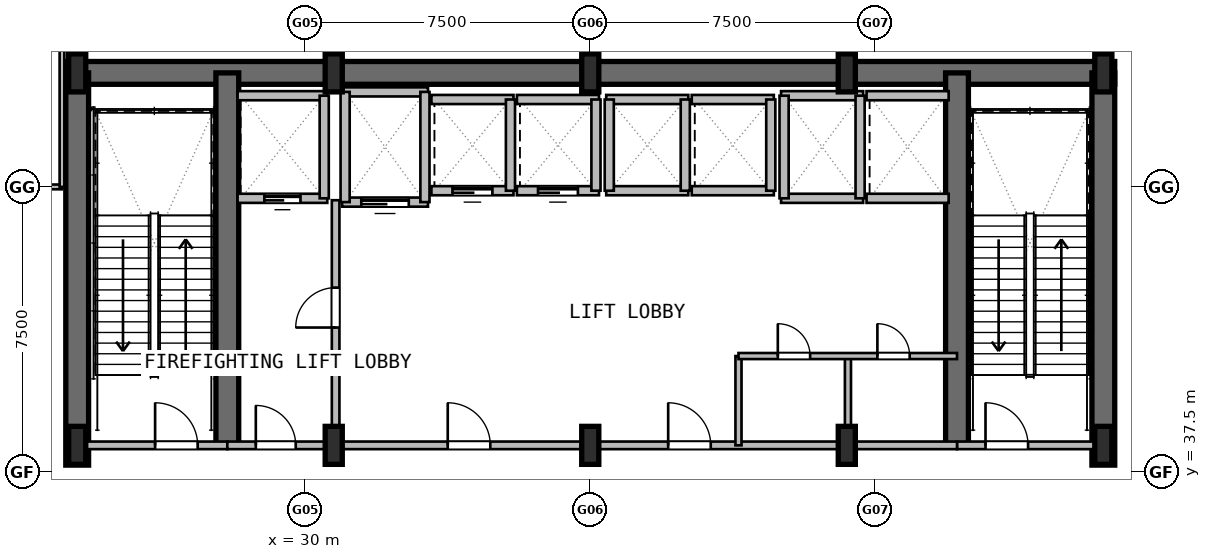
"""IFC4 building model, lengths in metres.
Left out: names, types, materials, properties, quantities, classifications, styles, units other than length and angle.
Written with IfcOpenShell. Run it as: python <this file> out.ifc"""

import sys

from ifc_helpers import new_model, si_unit, direction, frame, frame_2d, origin, origin_2d, place, context, subcontext, project, spatial, rectangle, i_section, extrude, element, fill, save


model = new_model("IFC4")
c1 = context("Model", 3, precision=1e-05, world=origin(), true_north=direction((0.0, 1.0)))
c2 = subcontext(c1, "Body", "Model", "MODEL_VIEW")
j1 = project(units=[si_unit("LENGTHUNIT", "METRE"), si_unit("PLANEANGLEUNIT", "RADIAN")], contexts=[c1])
p1 = place(None, origin())
s1 = spatial("IfcSite", under=j1, at=p1, CompositionType="ELEMENT")
p2 = place(p1, origin())
s2 = spatial("IfcBuilding", under=s1, at=p2, CompositionType="ELEMENT")
p3 = place(p2, frame((0.0, 0.0, 25.2)))
s3 = spatial("IfcBuildingStorey", under=s2, at=p3, CompositionType="ELEMENT", Elevation=25.2)
p4 = place(p3, frame((23.7, 48.0, 0.0), z_axis=(0.0, 0.0, 1.0), x_axis=(1.0, 0.0, 0.0)))
e1 = element("IfcWall", 1, at=p4, inside=s3, PredefinedType="SHEAR", context=c2, shape_type="SweptSolid", body=[
    extrude(rectangle(XDim=27.6, YDim=0.6, at=frame_2d((13.8, 0.0))), origin(), (0.0, 0.0, 1.0), 5.4),
])
for number, where, z_axis, x_axis in (
    (2, (24.0, 37.68, 0.0), (0.0, 0.0, 1.0), (0.0, 1.0, 0.0)),
    (3, (51.0, 37.68, 0.0), (0.0, 0.0, 1.0), (0.0, 1.0, 0.0)),
):
    element("IfcWall", number, at=place(p3, frame(where, z_axis=z_axis, x_axis=x_axis)), inside=s3, PredefinedType="SHEAR", context=c2, shape_type="SweptSolid", body=[
        extrude(rectangle(XDim=10.32, YDim=0.6, at=frame_2d((5.16, 0.0))), origin(), (0.0, 0.0, 1.0), 5.4),
    ])
for number, where, z_axis, x_axis in (
    (4, (27.95, 38.2, 0.0), (0.0, 0.0, 1.0), (0.0, 1.0, 0.0)),
    (5, (47.15, 38.2, 0.0), (0.0, 0.0, 1.0), (0.0, 1.0, 0.0)),
):
    element("IfcWall", number, at=place(p3, frame(where, z_axis=z_axis, x_axis=x_axis)), inside=s3, PredefinedType="SHEAR", context=c2, shape_type="SweptSolid", body=[
        extrude(rectangle(XDim=9.8, YDim=0.6, at=frame_2d((4.9, 0.0))), origin(), (0.0, 0.0, 1.0), 5.4),
    ])
for number, where, z_axis, x_axis in (
    (6, (24.0, 38.2, 0.0), (0.0, 0.0, 1.0), (1.0, 0.0, 0.0)),
    (7, (24.0, 48.0, 0.0), (0.0, 0.0, 1.0), (1.0, 0.0, 0.0)),
    (8, (30.75, 38.2, 0.0), (0.0, 0.0, 1.0), (1.0, 0.0, 0.0)),
    (9, (30.75, 48.0, 0.0), (0.0, 0.0, 1.0), (1.0, 0.0, 0.0)),
    (10, (37.5, 38.2, 0.0), (0.0, 0.0, 1.0), (1.0, 0.0, 0.0)),
    (11, (37.5, 48.0, 0.0), (0.0, 0.0, 1.0), (1.0, 0.0, 0.0)),
    (12, (44.25, 38.2, 0.0), (0.0, 0.0, 1.0), (1.0, 0.0, 0.0)),
    (13, (44.25, 48.0, 0.0), (0.0, 0.0, 1.0), (1.0, 0.0, 0.0)),
    (14, (51.0, 38.2, 0.0), (0.0, 0.0, 1.0), (1.0, 0.0, 0.0)),
    (15, (51.0, 48.0, 0.0), (0.0, 0.0, 1.0), (1.0, 0.0, 0.0)),
):
    element("IfcColumn", number, at=place(p3, frame(where, z_axis=z_axis, x_axis=x_axis)), inside=s3, PredefinedType="COLUMN", context=c2, shape_type="SweptSolid", body=[
        extrude(i_section(OverallWidth=0.45, OverallDepth=1.0, WebThickness=0.022, FlangeThickness=0.04, at=origin_2d()), origin(), (0.0, 0.0, 1.0), 5.4),
    ])
p5 = place(p3, frame((24.0, 38.2, 0.0), z_axis=(0.0, 0.0, 1.0), x_axis=(1.0, 0.0, 0.0)))
e16 = element("IfcWall", 16, at=p5, inside=s3, PredefinedType="PARTITIONING", context=c2, shape_type="SweptSolid", body=[
    extrude(rectangle(XDim=3.95, YDim=0.2, at=frame_2d((1.975, 0.0))), origin(), (0.0, 0.0, 1.0), 4.33),
])
p6 = place(p5, frame((2.05, 0.0, 0.0)))
e17 = element("IfcOpeningElement", 17, at=p6, cuts=e16, PredefinedType="OPENING", context=c2, shape_type="SweptSolid", body=[
    extrude(rectangle(XDim=1.12, YDim=2.1, at=frame_2d((0.56, 1.05))), frame((0.0, 0.11, 0.0), z_axis=(0.0, -1.0, 0.0), x_axis=(1.0, 0.0, 0.0)), (0.0, 0.0, 1.0), 0.22),
])
p7 = place(p3, frame((47.15, 38.2, 0.0), z_axis=(0.0, 0.0, 1.0), x_axis=(1.0, 0.0, 0.0)))
e18 = element("IfcWall", 18, at=p7, inside=s3, PredefinedType="PARTITIONING", context=c2, shape_type="SweptSolid", body=[
    extrude(rectangle(XDim=3.85, YDim=0.2, at=frame_2d((1.925, 0.0))), origin(), (0.0, 0.0, 1.0), 4.33),
])
p8 = place(p7, frame((0.75, 0.0, 0.0)))
e19 = element("IfcOpeningElement", 19, at=p8, cuts=e18, PredefinedType="OPENING", context=c2, shape_type="SweptSolid", body=[
    extrude(rectangle(XDim=1.12, YDim=2.1, at=frame_2d((0.56, 1.05))), frame((0.0, 0.11, 0.0), z_axis=(0.0, -1.0, 0.0), x_axis=(1.0, 0.0, 0.0)), (0.0, 0.0, 1.0), 0.22),
])
p9 = place(p3, frame((30.8, 38.2, 0.0), z_axis=(0.0, 0.0, 1.0), x_axis=(0.0, 1.0, 0.0)))
e20 = element("IfcWall", 20, at=p9, inside=s3, PredefinedType="PARTITIONING", context=c2, shape_type="SweptSolid", body=[
    extrude(rectangle(XDim=6.45, YDim=0.2, at=frame_2d((3.225, 0.0))), origin(), (0.0, 0.0, 1.0), 4.33),
])
p10 = place(p9, frame((3.1, 0.0, 0.0)))
e21 = element("IfcOpeningElement", 21, at=p10, cuts=e20, PredefinedType="OPENING", context=c2, shape_type="SweptSolid", body=[
    extrude(rectangle(XDim=1.05, YDim=2.1, at=frame_2d((0.525, 1.05))), frame((0.0, 0.11, 0.0), z_axis=(0.0, -1.0, 0.0), x_axis=(1.0, 0.0, 0.0)), (0.0, 0.0, 1.0), 0.22),
])
p11 = place(p3, frame((27.95, 38.2, 0.0), z_axis=(0.0, 0.0, 1.0), x_axis=(1.0, 0.0, 0.0)))
e22 = element("IfcWall", 22, at=p11, inside=s3, PredefinedType="PARTITIONING", context=c2, shape_type="SweptSolid", body=[
    extrude(rectangle(XDim=2.85, YDim=0.2, at=frame_2d((1.425, 0.0))), origin(), (0.0, 0.0, 1.0), 4.33),
])
p12 = place(p11, frame((0.75, 0.0, 0.0)))
e23 = element("IfcOpeningElement", 23, at=p12, cuts=e22, PredefinedType="OPENING", context=c2, shape_type="SweptSolid", body=[
    extrude(rectangle(XDim=1.05, YDim=2.1, at=frame_2d((0.525, 1.05))), frame((0.0, 0.11, 0.0), z_axis=(0.0, -1.0, 0.0), x_axis=(1.0, 0.0, 0.0)), (0.0, 0.0, 1.0), 0.22),
])
p13 = place(p3, frame((30.8, 38.2, 0.0), z_axis=(0.0, 0.0, 1.0), x_axis=(1.0, 0.0, 0.0)))
e24 = element("IfcWall", 24, at=p13, inside=s3, PredefinedType="PARTITIONING", context=c2, shape_type="SweptSolid", body=[
    extrude(rectangle(XDim=16.35, YDim=0.2, at=frame_2d((8.175, 0.0))), origin(), (0.0, 0.0, 1.0), 4.33),
])
p14 = place(p13, frame((2.95, 0.0, 0.0)))
e25 = element("IfcOpeningElement", 25, at=p14, cuts=e24, PredefinedType="OPENING", context=c2, shape_type="SweptSolid", body=[
    extrude(rectangle(XDim=1.12, YDim=2.1, at=frame_2d((0.56, 1.05))), frame((0.0, 0.11, 0.0), z_axis=(0.0, -1.0, 0.0), x_axis=(1.0, 0.0, 0.0)), (0.0, 0.0, 1.0), 0.22),
])
p15 = place(p13, frame((8.75, 0.0, 0.0)))
e26 = element("IfcOpeningElement", 26, at=p15, cuts=e24, PredefinedType="OPENING", context=c2, shape_type="SweptSolid", body=[
    extrude(rectangle(XDim=1.12, YDim=2.1, at=frame_2d((0.56, 1.05))), frame((0.0, 0.11, 0.0), z_axis=(0.0, -1.0, 0.0), x_axis=(1.0, 0.0, 0.0)), (0.0, 0.0, 1.0), 0.22),
])
p16 = place(p3, frame((28.22, 44.7, 0.0), z_axis=(0.0, 0.0, 1.0), x_axis=(1.0, 0.0, 0.0)))
e27 = element("IfcWall", 27, at=p16, inside=s3, PredefinedType="PARTITIONING", context=c2, shape_type="SweptSolid", body=[
    extrude(rectangle(XDim=2.36, YDim=0.24, at=frame_2d((1.18, 0.0))), origin(), (0.0, 0.0, 1.0), 5.13),
])
p17 = place(p16, frame((0.705, 0.0, 0.0)))
e28 = element("IfcOpeningElement", 28, at=p17, cuts=e27, PredefinedType="OPENING", context=c2, shape_type="SweptSolid", body=[
    extrude(rectangle(XDim=0.95, YDim=2.15, at=frame_2d((0.475, 1.075))), frame((0.0, 0.13, 0.0), z_axis=(0.0, -1.0, 0.0), x_axis=(1.0, 0.0, 0.0)), (0.0, 0.0, 1.0), 0.26),
])
p18 = place(p3, frame((28.22, 47.4, 0.0), z_axis=(0.0, 0.0, 1.0), x_axis=(1.0, 0.0, 0.0)))
e29 = element("IfcWall", 29, at=p18, inside=s3, PredefinedType="PARTITIONING", context=c2, shape_type="SweptSolid", body=[
    extrude(rectangle(XDim=2.36, YDim=0.24, at=frame_2d((1.18, 0.0))), origin(), (0.0, 0.0, 1.0), 5.13),
])
p19 = place(p3, frame((30.5, 44.7, 0.0), z_axis=(0.0, 0.0, 1.0), x_axis=(0.0, 1.0, 0.0)))
e30 = element("IfcWall", 30, at=p19, inside=s3, PredefinedType="PARTITIONING", context=c2, shape_type="SweptSolid", body=[
    extrude(rectangle(XDim=2.7, YDim=0.24, at=frame_2d((1.35, 0.0))), origin(), (0.0, 0.0, 1.0), 4.33),
])
p20 = place(p3, frame((30.97, 44.6, 0.0), z_axis=(0.0, 0.0, 1.0), x_axis=(1.0, 0.0, 0.0)))
e31 = element("IfcWall", 31, at=p20, inside=s3, PredefinedType="PARTITIONING", context=c2, shape_type="SweptSolid", body=[
    extrude(rectangle(XDim=2.26, YDim=0.24, at=frame_2d((1.13, 0.0))), origin(), (0.0, 0.0, 1.0), 5.13),
])
p21 = place(p20, frame((0.505, 0.0, 0.0)))
e32 = element("IfcOpeningElement", 32, at=p21, cuts=e31, PredefinedType="OPENING", context=c2, shape_type="SweptSolid", body=[
    extrude(rectangle(XDim=1.25, YDim=2.2, at=frame_2d((0.625, 1.1))), frame((0.0, 0.13, 0.0), z_axis=(0.0, -1.0, 0.0), x_axis=(1.0, 0.0, 0.0)), (0.0, 0.0, 1.0), 0.26),
])
p22 = place(p3, frame((30.97, 47.5, 0.0), z_axis=(0.0, 0.0, 1.0), x_axis=(1.0, 0.0, 0.0)))
e33 = element("IfcWall", 33, at=p22, inside=s3, PredefinedType="PARTITIONING", context=c2, shape_type="SweptSolid", body=[
    extrude(rectangle(XDim=2.26, YDim=0.24, at=frame_2d((1.13, 0.0))), origin(), (0.0, 0.0, 1.0), 5.13),
])
p23 = place(p3, frame((31.05, 44.6, 0.0), z_axis=(0.0, 0.0, 1.0), x_axis=(0.0, 1.0, 0.0)))
e34 = element("IfcWall", 34, at=p23, inside=s3, PredefinedType="PARTITIONING", context=c2, shape_type="SweptSolid", body=[
    extrude(rectangle(XDim=2.9, YDim=0.24, at=frame_2d((1.45, 0.0))), origin(), (0.0, 0.0, 1.0), 4.33),
])
p24 = place(p3, frame((33.15, 44.6, 0.0), z_axis=(0.0, 0.0, 1.0), x_axis=(0.0, 1.0, 0.0)))
e35 = element("IfcWall", 35, at=p24, inside=s3, PredefinedType="PARTITIONING", context=c2, shape_type="SweptSolid", body=[
    extrude(rectangle(XDim=2.9, YDim=0.24, at=frame_2d((1.45, 0.0))), origin(), (0.0, 0.0, 1.0), 5.13),
])
p25 = place(p3, frame((33.32, 44.9, 0.0), z_axis=(0.0, 0.0, 1.0), x_axis=(1.0, 0.0, 0.0)))
e36 = element("IfcWall", 36, at=p25, inside=s3, PredefinedType="PARTITIONING", context=c2, shape_type="SweptSolid", body=[
    extrude(rectangle(XDim=2.16, YDim=0.24, at=frame_2d((1.08, 0.0))), origin(), (0.0, 0.0, 1.0), 5.13),
])
p26 = place(p25, frame((0.555, 0.0, 0.0)))
e37 = element("IfcOpeningElement", 37, at=p26, cuts=e36, PredefinedType="OPENING", context=c2, shape_type="SweptSolid", body=[
    extrude(rectangle(XDim=1.05, YDim=2.15, at=frame_2d((0.525, 1.075))), frame((0.0, 0.13, 0.0), z_axis=(0.0, -1.0, 0.0), x_axis=(1.0, 0.0, 0.0)), (0.0, 0.0, 1.0), 0.26),
])
p27 = place(p3, frame((33.32, 47.3, 0.0), z_axis=(0.0, 0.0, 1.0), x_axis=(1.0, 0.0, 0.0)))
e38 = element("IfcWall", 38, at=p27, inside=s3, PredefinedType="PARTITIONING", context=c2, shape_type="SweptSolid", body=[
    extrude(rectangle(XDim=2.16, YDim=0.24, at=frame_2d((1.08, 0.0))), origin(), (0.0, 0.0, 1.0), 5.13),
])
p28 = place(p3, frame((35.4, 44.9, 0.0), z_axis=(0.0, 0.0, 1.0), x_axis=(0.0, 1.0, 0.0)))
e39 = element("IfcWall", 39, at=p28, inside=s3, PredefinedType="PARTITIONING", context=c2, shape_type="SweptSolid", body=[
    extrude(rectangle(XDim=2.4, YDim=0.24, at=frame_2d((1.2, 0.0))), origin(), (0.0, 0.0, 1.0), 5.13),
])
p29 = place(p3, frame((35.57, 44.9, 0.0), z_axis=(0.0, 0.0, 1.0), x_axis=(1.0, 0.0, 0.0)))
e40 = element("IfcWall", 40, at=p29, inside=s3, PredefinedType="PARTITIONING", context=c2, shape_type="SweptSolid", body=[
    extrude(rectangle(XDim=2.16, YDim=0.24, at=frame_2d((1.08, 0.0))), origin(), (0.0, 0.0, 1.0), 5.13),
])
p30 = place(p29, frame((0.555, 0.0, 0.0)))
e41 = element("IfcOpeningElement", 41, at=p30, cuts=e40, PredefinedType="OPENING", context=c2, shape_type="SweptSolid", body=[
    extrude(rectangle(XDim=1.05, YDim=2.15, at=frame_2d((0.525, 1.075))), frame((0.0, 0.13, 0.0), z_axis=(0.0, -1.0, 0.0), x_axis=(1.0, 0.0, 0.0)), (0.0, 0.0, 1.0), 0.26),
])
p31 = place(p3, frame((35.57, 47.3, 0.0), z_axis=(0.0, 0.0, 1.0), x_axis=(1.0, 0.0, 0.0)))
e42 = element("IfcWall", 42, at=p31, inside=s3, PredefinedType="PARTITIONING", context=c2, shape_type="SweptSolid", body=[
    extrude(rectangle(XDim=2.16, YDim=0.24, at=frame_2d((1.08, 0.0))), origin(), (0.0, 0.0, 1.0), 5.13),
])
p32 = place(p3, frame((37.65, 44.9, 0.0), z_axis=(0.0, 0.0, 1.0), x_axis=(0.0, 1.0, 0.0)))
e43 = element("IfcWall", 43, at=p32, inside=s3, PredefinedType="PARTITIONING", context=c2, shape_type="SweptSolid", body=[
    extrude(rectangle(XDim=2.4, YDim=0.24, at=frame_2d((1.2, 0.0))), origin(), (0.0, 0.0, 1.0), 5.13),
])
for number, where, z_axis, x_axis in (
    (44, (37.92, 44.9, 0.0), (0.0, 0.0, 1.0), (1.0, 0.0, 0.0)),
    (45, (37.92, 47.3, 0.0), (0.0, 0.0, 1.0), (1.0, 0.0, 0.0)),
):
    element("IfcWall", number, at=place(p3, frame(where, z_axis=z_axis, x_axis=x_axis)), inside=s3, PredefinedType="PARTITIONING", context=c2, shape_type="SweptSolid", body=[
        extrude(rectangle(XDim=2.16, YDim=0.24, at=frame_2d((1.08, 0.0))), origin(), (0.0, 0.0, 1.0), 5.13),
    ])
for number, where, z_axis, x_axis in (
    (46, (38.0, 44.9, 0.0), (0.0, 0.0, 1.0), (0.0, 1.0, 0.0)),
    (47, (40.0, 44.9, 0.0), (0.0, 0.0, 1.0), (0.0, 1.0, 0.0)),
):
    element("IfcWall", number, at=place(p3, frame(where, z_axis=z_axis, x_axis=x_axis)), inside=s3, PredefinedType="PARTITIONING", context=c2, shape_type="SweptSolid", body=[
        extrude(rectangle(XDim=2.4, YDim=0.24, at=frame_2d((1.2, 0.0))), origin(), (0.0, 0.0, 1.0), 5.13),
    ])
for number, where, z_axis, x_axis in (
    (48, (40.17, 44.9, 0.0), (0.0, 0.0, 1.0), (1.0, 0.0, 0.0)),
    (49, (40.17, 47.3, 0.0), (0.0, 0.0, 1.0), (1.0, 0.0, 0.0)),
):
    element("IfcWall", number, at=place(p3, frame(where, z_axis=z_axis, x_axis=x_axis)), inside=s3, PredefinedType="PARTITIONING", context=c2, shape_type="SweptSolid", body=[
        extrude(rectangle(XDim=2.16, YDim=0.24, at=frame_2d((1.08, 0.0))), origin(), (0.0, 0.0, 1.0), 5.13),
    ])
p33 = place(p3, frame((42.25, 44.9, 0.0), z_axis=(0.0, 0.0, 1.0), x_axis=(0.0, 1.0, 0.0)))
e50 = element("IfcWall", 50, at=p33, inside=s3, PredefinedType="PARTITIONING", context=c2, shape_type="SweptSolid", body=[
    extrude(rectangle(XDim=2.4, YDim=0.24, at=frame_2d((1.2, 0.0))), origin(), (0.0, 0.0, 1.0), 5.13),
])
for number, where, z_axis, x_axis in (
    (51, (42.52, 44.7, 0.0), (0.0, 0.0, 1.0), (1.0, 0.0, 0.0)),
    (52, (42.52, 47.4, 0.0), (0.0, 0.0, 1.0), (1.0, 0.0, 0.0)),
):
    element("IfcWall", number, at=place(p3, frame(where, z_axis=z_axis, x_axis=x_axis)), inside=s3, PredefinedType="PARTITIONING", context=c2, shape_type="SweptSolid", body=[
        extrude(rectangle(XDim=2.16, YDim=0.24, at=frame_2d((1.08, 0.0))), origin(), (0.0, 0.0, 1.0), 5.13),
    ])
for number, where, z_axis, x_axis in (
    (53, (42.6, 44.7, 0.0), (0.0, 0.0, 1.0), (0.0, 1.0, 0.0)),
    (54, (44.6, 44.7, 0.0), (0.0, 0.0, 1.0), (0.0, 1.0, 0.0)),
):
    element("IfcWall", number, at=place(p3, frame(where, z_axis=z_axis, x_axis=x_axis)), inside=s3, PredefinedType="PARTITIONING", context=c2, shape_type="SweptSolid", body=[
        extrude(rectangle(XDim=2.7, YDim=0.24, at=frame_2d((1.35, 0.0))), origin(), (0.0, 0.0, 1.0), 5.13),
    ])
for number, where, z_axis, x_axis in (
    (55, (44.77, 44.7, 0.0), (0.0, 0.0, 1.0), (1.0, 0.0, 0.0)),
    (56, (44.77, 47.4, 0.0), (0.0, 0.0, 1.0), (1.0, 0.0, 0.0)),
):
    element("IfcWall", number, at=place(p3, frame(where, z_axis=z_axis, x_axis=x_axis)), inside=s3, PredefinedType="PARTITIONING", context=c2, shape_type="SweptSolid", body=[
        extrude(rectangle(XDim=2.16, YDim=0.24, at=frame_2d((1.08, 0.0))), origin(), (0.0, 0.0, 1.0), 5.13),
    ])
p34 = place(p3, frame((19.0, 45.0, 0.0), z_axis=(0.0, 0.0, 1.0), x_axis=(1.0, 0.0, 0.0)))
e57 = element("IfcWall", 57, at=p34, inside=s3, PredefinedType="PARTITIONING", context=c2, shape_type="SweptSolid", body=[
    extrude(rectangle(XDim=4.6, YDim=0.125, at=frame_2d((2.3, 0.0))), origin(), (0.0, 0.0, 1.0), 5.13),
])
p35 = place(p34, frame((1.5, 0.0, 0.0)))
e58 = element("IfcOpeningElement", 58, at=p35, cuts=e57, PredefinedType="OPENING", context=c2, shape_type="SweptSolid", body=[
    extrude(rectangle(XDim=0.9, YDim=2.05, at=frame_2d((0.45, 1.025))), frame((0.0, 0.073, 0.0), z_axis=(0.0, -1.0, 0.0), x_axis=(1.0, 0.0, 0.0)), (0.0, 0.0, 1.0), 0.145),
])
p36 = place(p3, frame((23.6, 45.0, 0.0), z_axis=(0.0, 0.0, 1.0), x_axis=(0.0, 1.0, 0.0)))
e59 = element("IfcWall", 59, at=p36, inside=s3, PredefinedType="PARTITIONING", context=c2, shape_type="SweptSolid", body=[
    extrude(rectangle(XDim=4.6, YDim=0.125, at=frame_2d((2.3, 0.0))), origin(), (0.0, 0.0, 1.0), 2.63),
])
for number, where, z_axis, x_axis in (
    (60, (41.4, 38.2, 0.0), (0.0, 0.0, 1.0), (0.0, 1.0, 0.0)),
    (61, (44.28, 38.2, 0.0), (0.0, 0.0, 1.0), (0.0, 1.0, 0.0)),
):
    element("IfcWall", number, at=place(p3, frame(where, z_axis=z_axis, x_axis=x_axis)), inside=s3, PredefinedType="PARTITIONING", context=c2, shape_type="SweptSolid", body=[
        extrude(rectangle(XDim=2.35, YDim=0.16, at=frame_2d((1.175, 0.0))), origin(), (0.0, 0.0, 1.0), 5.13),
    ])
p37 = place(p3, frame((41.4, 40.55, 0.0), z_axis=(0.0, 0.0, 1.0), x_axis=(1.0, 0.0, 0.0)))
e62 = element("IfcWall", 62, at=p37, inside=s3, PredefinedType="PARTITIONING", context=c2, shape_type="SweptSolid", body=[
    extrude(rectangle(XDim=5.75, YDim=0.16, at=frame_2d((2.875, 0.0))), origin(), (0.0, 0.0, 1.0), 5.13),
])
p38 = place(p37, frame((1.035, 0.0, 0.0)))
e63 = element("IfcOpeningElement", 63, at=p38, cuts=e62, PredefinedType="OPENING", context=c2, shape_type="SweptSolid", body=[
    extrude(rectangle(XDim=0.85, YDim=2.05, at=frame_2d((0.425, 1.025))), frame((0.0, 0.09, 0.0), z_axis=(0.0, -1.0, 0.0), x_axis=(1.0, 0.0, 0.0)), (0.0, 0.0, 1.0), 0.18),
])
p39 = place(p37, frame((3.655, 0.0, 0.0)))
e64 = element("IfcOpeningElement", 64, at=p39, cuts=e62, PredefinedType="OPENING", context=c2, shape_type="SweptSolid", body=[
    extrude(rectangle(XDim=0.85, YDim=2.05, at=frame_2d((0.425, 1.025))), frame((0.0, 0.09, 0.0), z_axis=(0.0, -1.0, 0.0), x_axis=(1.0, 0.0, 0.0)), (0.0, 0.0, 1.0), 0.18),
])
p40 = place(p6, origin())
e65 = element("IfcDoor", 65, at=p40, inside=s3, OperationType="SINGLE_SWING_RIGHT", PredefinedType="DOOR", context=c2, shape_type="SweptSolid", body=[
    extrude(rectangle(XDim=1.12, YDim=2.1, at=frame_2d((0.56, 1.05))), frame((0.0, 0.025, 0.0), z_axis=(0.0, -1.0, 0.0), x_axis=(1.0, 0.0, 0.0)), (0.0, 0.0, 1.0), 0.05),
])
fill(e17, e65)
p41 = place(p8, origin())
e66 = element("IfcDoor", 66, at=p41, inside=s3, OperationType="SINGLE_SWING_LEFT", PredefinedType="DOOR", context=c2, shape_type="SweptSolid", body=[
    extrude(rectangle(XDim=1.12, YDim=2.1, at=frame_2d((0.56, 1.05))), frame((0.0, 0.025, 0.0), z_axis=(0.0, -1.0, 0.0), x_axis=(1.0, 0.0, 0.0)), (0.0, 0.0, 1.0), 0.05),
])
fill(e19, e66)
p42 = place(p10, origin())
e67 = element("IfcDoor", 67, at=p42, inside=s3, OperationType="SINGLE_SWING_RIGHT", PredefinedType="DOOR", context=c2, shape_type="SweptSolid", body=[
    extrude(rectangle(XDim=1.05, YDim=2.1, at=frame_2d((0.525, 1.05))), frame((0.0, 0.025, 0.0), z_axis=(0.0, -1.0, 0.0), x_axis=(1.0, 0.0, 0.0)), (0.0, 0.0, 1.0), 0.05),
])
fill(e21, e67)
p43 = place(p12, origin())
e68 = element("IfcDoor", 68, at=p43, inside=s3, OperationType="SINGLE_SWING_LEFT", PredefinedType="DOOR", context=c2, shape_type="SweptSolid", body=[
    extrude(rectangle(XDim=1.05, YDim=2.1, at=frame_2d((0.525, 1.05))), frame((0.0, 0.025, 0.0), z_axis=(0.0, -1.0, 0.0), x_axis=(1.0, 0.0, 0.0)), (0.0, 0.0, 1.0), 0.05),
])
fill(e23, e68)
p44 = place(p14, origin())
e69 = element("IfcDoor", 69, at=p44, inside=s3, OperationType="SINGLE_SWING_RIGHT", PredefinedType="DOOR", context=c2, shape_type="SweptSolid", body=[
    extrude(rectangle(XDim=1.12, YDim=2.1, at=frame_2d((0.56, 1.05))), frame((0.0, 0.025, 0.0), z_axis=(0.0, -1.0, 0.0), x_axis=(1.0, 0.0, 0.0)), (0.0, 0.0, 1.0), 0.05),
])
fill(e25, e69)
p45 = place(p15, origin())
e70 = element("IfcDoor", 70, at=p45, inside=s3, OperationType="SINGLE_SWING_LEFT", PredefinedType="DOOR", context=c2, shape_type="SweptSolid", body=[
    extrude(rectangle(XDim=1.12, YDim=2.1, at=frame_2d((0.56, 1.05))), frame((0.0, 0.025, 0.0), z_axis=(0.0, -1.0, 0.0), x_axis=(1.0, 0.0, 0.0)), (0.0, 0.0, 1.0), 0.05),
])
fill(e26, e70)
p46 = place(p17, origin())
e71 = element("IfcDoor", 71, at=p46, inside=s3, OperationType="SLIDING_TO_LEFT", PredefinedType="DOOR", context=c2, shape_type="SweptSolid", body=[
    extrude(rectangle(XDim=0.95, YDim=2.15, at=frame_2d((0.475, 1.075))), frame((0.0, 0.025, 0.0), z_axis=(0.0, -1.0, 0.0), x_axis=(1.0, 0.0, 0.0)), (0.0, 0.0, 1.0), 0.05),
])
fill(e28, e71)
p47 = place(p21, origin())
e72 = element("IfcDoor", 72, at=p47, inside=s3, OperationType="SLIDING_TO_LEFT", PredefinedType="DOOR", context=c2, shape_type="SweptSolid", body=[
    extrude(rectangle(XDim=1.25, YDim=2.2, at=frame_2d((0.625, 1.1))), frame((0.0, 0.025, 0.0), z_axis=(0.0, -1.0, 0.0), x_axis=(1.0, 0.0, 0.0)), (0.0, 0.0, 1.0), 0.05),
])
fill(e32, e72)
p48 = place(p26, origin())
e73 = element("IfcDoor", 73, at=p48, inside=s3, OperationType="SLIDING_TO_LEFT", PredefinedType="DOOR", context=c2, shape_type="SweptSolid", body=[
    extrude(rectangle(XDim=1.05, YDim=2.15, at=frame_2d((0.525, 1.075))), frame((0.0, 0.025, 0.0), z_axis=(0.0, -1.0, 0.0), x_axis=(1.0, 0.0, 0.0)), (0.0, 0.0, 1.0), 0.05),
])
fill(e37, e73)
p49 = place(p30, origin())
e74 = element("IfcDoor", 74, at=p49, inside=s3, OperationType="SLIDING_TO_LEFT", PredefinedType="DOOR", context=c2, shape_type="SweptSolid", body=[
    extrude(rectangle(XDim=1.05, YDim=2.15, at=frame_2d((0.525, 1.075))), frame((0.0, 0.025, 0.0), z_axis=(0.0, -1.0, 0.0), x_axis=(1.0, 0.0, 0.0)), (0.0, 0.0, 1.0), 0.05),
])
fill(e41, e74)
p50 = place(p38, origin())
e75 = element("IfcDoor", 75, at=p50, inside=s3, OperationType="SINGLE_SWING_RIGHT", PredefinedType="DOOR", context=c2, shape_type="SweptSolid", body=[
    extrude(rectangle(XDim=0.85, YDim=2.05, at=frame_2d((0.425, 1.025))), frame((0.0, 0.025, 0.0), z_axis=(0.0, -1.0, 0.0), x_axis=(1.0, 0.0, 0.0)), (0.0, 0.0, 1.0), 0.05),
])
fill(e63, e75)
p51 = place(p39, origin())
e76 = element("IfcDoor", 76, at=p51, inside=s3, OperationType="SINGLE_SWING_LEFT", PredefinedType="DOOR", context=c2, shape_type="SweptSolid", body=[
    extrude(rectangle(XDim=0.85, YDim=2.05, at=frame_2d((0.425, 1.025))), frame((0.0, 0.025, 0.0), z_axis=(0.0, -1.0, 0.0), x_axis=(1.0, 0.0, 0.0)), (0.0, 0.0, 1.0), 0.05),
])
fill(e64, e76)
save(model, sys.argv[1])
